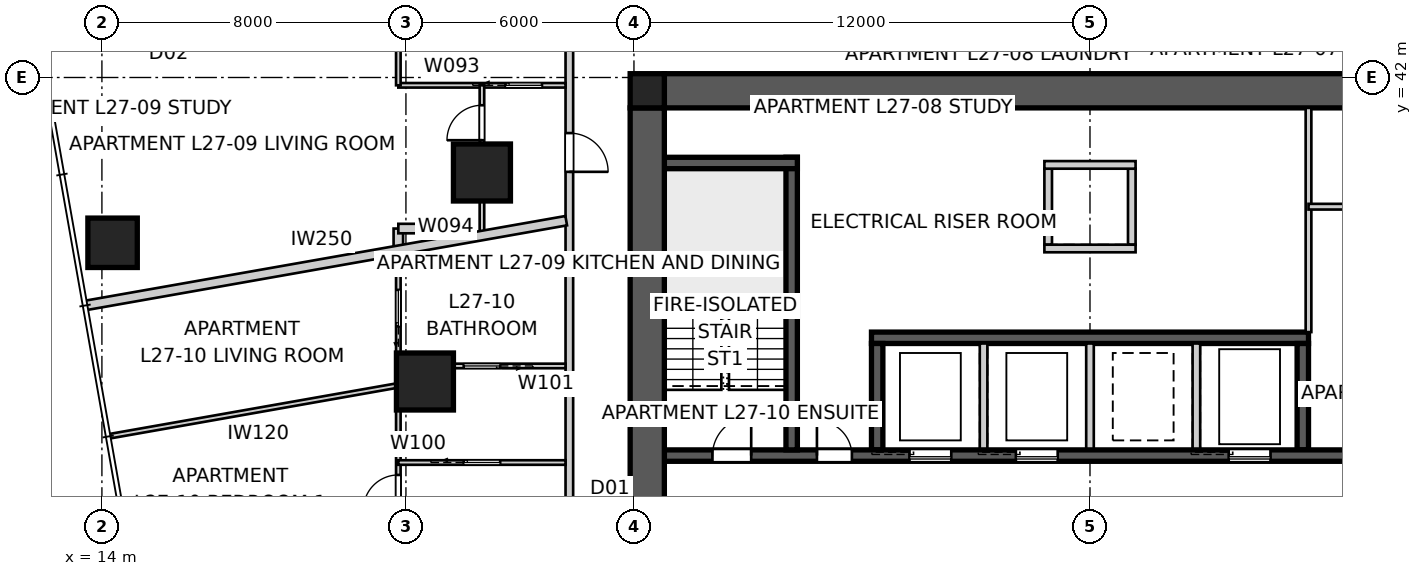
"""IFC4 building model, lengths in metres.
Left out: names, types, materials, properties, quantities, classifications, styles, units other than length and angle.
Written with IfcOpenShell. Run it as: python <this file> out.ifc"""

import sys

from ifc_helpers import new_model, si_unit, direction, frame, frame_2d, origin, origin_2d, place, context, subcontext, project, spatial, polyline, rectangle, outline, extrude, element, fill, save


model = new_model("IFC4")
c1 = context("Model", 3, precision=1e-05, world=origin(), true_north=direction((0.0, 1.0)))
c2 = subcontext(c1, "Body", "Model", "MODEL_VIEW")
j1 = project(units=[si_unit("LENGTHUNIT", "METRE"), si_unit("PLANEANGLEUNIT", "RADIAN")], contexts=[c1])
p1 = place(None, origin())
s1 = spatial("IfcSite", under=j1, at=p1, CompositionType="ELEMENT")
p2 = place(p1, origin())
s2 = spatial("IfcBuilding", under=s1, at=p2, CompositionType="ELEMENT")
p3 = place(p2, frame((0.0, 0.0, 99.8)))
s3 = spatial("IfcBuildingStorey", under=s2, at=p3, CompositionType="ELEMENT", Elevation=99.8)
p4 = place(p3, frame((28.8, 41.65, 0.0), z_axis=(0.0, 0.0, 1.0), x_axis=(1.0, 0.0, 0.0)))
e1 = element("IfcWall", 1, at=p4, inside=s3, PredefinedType="SHEAR", context=c2, shape_type="SweptSolid", body=[
    extrude(outline(polyline([(0.0, -0.45), (22.4, -0.45), (22.4, -0.025), (22.85, -0.025), (22.85, 0.025), (22.4, 0.025), (22.4, 0.45), (0.0, 0.45), (0.0, 0.025), (-0.45, 0.025), (-0.45, -0.025), (0.0, -0.025), (0.0, -0.45)])), origin(), (0.0, 0.0, 1.0), 3.4),
])
p5 = place(p3, frame((28.35, 41.2, 0.0), z_axis=(0.0, 0.0, 1.0), x_axis=(0.0, -1.0, 0.0)))
e2 = element("IfcWall", 2, at=p5, inside=s3, PredefinedType="SHEAR", context=c2, shape_type="SweptSolid", body=[
    extrude(outline(polyline([(0.0, -0.45), (22.4, -0.45), (22.4, -0.025), (22.85, -0.025), (22.85, 0.025), (22.4, 0.025), (22.4, 0.45), (0.0, 0.45), (0.0, 0.025), (-0.45, 0.025), (-0.45, -0.025), (0.0, -0.025), (0.0, -0.45)])), origin(), (0.0, 0.0, 1.0), 3.4),
])
p6 = place(p5, frame((11.14, 0.0, 0.0)))
e3 = element("IfcOpeningElement", 3, at=p6, cuts=e2, PredefinedType="OPENING", context=c2, shape_type="SweptSolid", body=[
    extrude(rectangle(XDim=1.02, YDim=2.4, at=frame_2d((0.51, 1.2))), frame((0.0, 0.46, 0.0), z_axis=(0.0, -1.0, 0.0), x_axis=(1.0, 0.0, 0.0)), (0.0, 0.0, 1.0), 0.92),
])
p7 = place(p3, frame((28.8, 32.05, 0.0), z_axis=(0.0, 0.0, 1.0), x_axis=(1.0, 0.0, 0.0)))
e4 = element("IfcWall", 4, at=p7, inside=s3, PredefinedType="SHEAR", context=c2, shape_type="SweptSolid", body=[
    extrude(rectangle(XDim=22.4, YDim=0.3, at=frame_2d((11.2, 0.0))), origin(), (0.0, 0.0, 1.0), 3.4),
])
p8 = place(p7, frame((19.04, 0.0, 0.0)))
e5 = element("IfcOpeningElement", 5, at=p8, cuts=e4, PredefinedType="OPENING", context=c2, shape_type="SweptSolid", body=[
    extrude(rectangle(XDim=0.92, YDim=2.1, at=frame_2d((0.46, 1.05))), frame((0.0, 0.16, 0.0), z_axis=(0.0, -1.0, 0.0), x_axis=(1.0, 0.0, 0.0)), (0.0, 0.0, 1.0), 0.32),
])
p9 = place(p7, frame((1.265, 0.0, 0.0)))
e6 = element("IfcOpeningElement", 6, at=p9, cuts=e4, PredefinedType="OPENING", context=c2, shape_type="SweptSolid", body=[
    extrude(rectangle(XDim=1.02, YDim=2.1, at=frame_2d((0.51, 1.05))), frame((0.0, 0.16, 0.0), z_axis=(0.0, -1.0, 0.0), x_axis=(1.0, 0.0, 0.0)), (0.0, 0.0, 1.0), 0.32),
])
p10 = place(p7, frame((4.015, 0.0, 0.0)))
e7 = element("IfcOpeningElement", 7, at=p10, cuts=e4, PredefinedType="OPENING", context=c2, shape_type="SweptSolid", body=[
    extrude(rectangle(XDim=0.92, YDim=2.1, at=frame_2d((0.46, 1.05))), frame((0.0, 0.16, 0.0), z_axis=(0.0, -1.0, 0.0), x_axis=(1.0, 0.0, 0.0)), (0.0, 0.0, 1.0), 0.32),
])
p11 = place(p7, frame((6.45, 0.0, 0.0)))
e8 = element("IfcOpeningElement", 8, at=p11, cuts=e4, PredefinedType="OPENING", context=c2, shape_type="SweptSolid", body=[
    extrude(rectangle(XDim=1.1, YDim=2.1, at=frame_2d((0.55, 1.05))), frame((0.0, 0.16, 0.0), z_axis=(0.0, -1.0, 0.0), x_axis=(1.0, 0.0, 0.0)), (0.0, 0.0, 1.0), 0.32),
])
p12 = place(p7, frame((9.25, 0.0, 0.0)))
e9 = element("IfcOpeningElement", 9, at=p12, cuts=e4, PredefinedType="OPENING", context=c2, shape_type="SweptSolid", body=[
    extrude(rectangle(XDim=1.1, YDim=2.1, at=frame_2d((0.55, 1.05))), frame((0.0, 0.16, 0.0), z_axis=(0.0, -1.0, 0.0), x_axis=(1.0, 0.0, 0.0)), (0.0, 0.0, 1.0), 0.32),
])
p13 = place(p7, frame((14.85, 0.0, 0.0)))
e10 = element("IfcOpeningElement", 10, at=p13, cuts=e4, PredefinedType="OPENING", context=c2, shape_type="SweptSolid", body=[
    extrude(rectangle(XDim=1.1, YDim=2.1, at=frame_2d((0.55, 1.05))), frame((0.0, 0.16, 0.0), z_axis=(0.0, -1.0, 0.0), x_axis=(1.0, 0.0, 0.0)), (0.0, 0.0, 1.0), 0.32),
])
p14 = place(p3, frame((34.25, 35.15, 0.0), z_axis=(0.0, 0.0, 1.0), x_axis=(1.0, 0.0, 0.0)))
e11 = element("IfcWall", 11, at=p14, inside=s3, PredefinedType="SHEAR", context=c2, shape_type="SweptSolid", body=[
    extrude(rectangle(XDim=11.5, YDim=0.3, at=frame_2d((5.75, 0.0))), origin(), (0.0, 0.0, 1.0), 3.4),
])
p15 = place(p3, frame((34.4, 32.2, 0.0), z_axis=(0.0, 0.0, 1.0), x_axis=(0.0, 1.0, 0.0)))
e12 = element("IfcWall", 12, at=p15, inside=s3, PredefinedType="SHEAR", context=c2, shape_type="SweptSolid", body=[
    extrude(rectangle(XDim=2.8, YDim=0.3, at=frame_2d((1.4, 0.0))), origin(), (0.0, 0.0, 1.0), 3.4),
])
for number, where, z_axis, x_axis in (
    (13, (37.2, 32.2, 0.0), (0.0, 0.0, 1.0), (0.0, 1.0, 0.0)),
    (14, (40.0, 32.2, 0.0), (0.0, 0.0, 1.0), (0.0, 1.0, 0.0)),
    (15, (42.8, 32.2, 0.0), (0.0, 0.0, 1.0), (0.0, 1.0, 0.0)),
):
    element("IfcWall", number, at=place(p3, frame(where, z_axis=z_axis, x_axis=x_axis)), inside=s3, PredefinedType="SOLIDWALL", context=c2, shape_type="SweptSolid", body=[
        extrude(rectangle(XDim=2.8, YDim=0.2, at=frame_2d((1.4, 0.0))), origin(), (0.0, 0.0, 1.0), 3.4),
    ])
p16 = place(p3, frame((45.6, 32.2, 0.0), z_axis=(0.0, 0.0, 1.0), x_axis=(0.0, 1.0, 0.0)))
e16 = element("IfcWall", 16, at=p16, inside=s3, PredefinedType="SHEAR", context=c2, shape_type="SweptSolid", body=[
    extrude(rectangle(XDim=2.8, YDim=0.3, at=frame_2d((1.4, 0.0))), origin(), (0.0, 0.0, 1.0), 3.4),
])
p17 = place(p3, frame((32.15, 32.2, 0.0), z_axis=(0.0, 0.0, 1.0), x_axis=(0.0, 1.0, 0.0)))
e17 = element("IfcWall", 17, at=p17, inside=s3, PredefinedType="SHEAR", context=c2, shape_type="SweptSolid", body=[
    extrude(rectangle(XDim=7.7, YDim=0.3, at=frame_2d((3.85, 0.0))), origin(), (0.0, 0.0, 1.0), 3.4),
])
p18 = place(p3, frame((28.8, 39.75, 0.0), z_axis=(0.0, 0.0, 1.0), x_axis=(1.0, 0.0, 0.0)))
e18 = element("IfcWall", 18, at=p18, inside=s3, PredefinedType="SHEAR", context=c2, shape_type="SweptSolid", body=[
    extrude(rectangle(XDim=3.5, YDim=0.3, at=frame_2d((1.75, 0.0))), origin(), (0.0, 0.0, 1.0), 3.4),
])
for number, where, z_axis, x_axis in (
    (19, (38.9, 37.6, 0.0), (0.0, 0.0, 1.0), (0.0, 1.0, 0.0)),
    (20, (41.1, 37.6, 0.0), (0.0, 0.0, 1.0), (0.0, 1.0, 0.0)),
):
    element("IfcWall", number, at=place(p3, frame(where, z_axis=z_axis, x_axis=x_axis)), inside=s3, PredefinedType="SOLIDWALL", context=c2, shape_type="SweptSolid", body=[
        extrude(rectangle(XDim=2.0, YDim=0.2, at=frame_2d((1.0, 0.0))), origin(), (0.0, 0.0, 1.0), 3.4),
    ])
for number, where, z_axis, x_axis in (
    (21, (38.8, 37.5, 0.0), (0.0, 0.0, 1.0), (1.0, 0.0, 0.0)),
    (22, (38.8, 39.7, 0.0), (0.0, 0.0, 1.0), (1.0, 0.0, 0.0)),
):
    element("IfcWall", number, at=place(p3, frame(where, z_axis=z_axis, x_axis=x_axis)), inside=s3, PredefinedType="SOLIDWALL", context=c2, shape_type="SweptSolid", body=[
        extrude(rectangle(XDim=2.4, YDim=0.2, at=frame_2d((1.2, 0.0))), origin(), (0.0, 0.0, 1.0), 3.4),
    ])
p19 = place(p3, frame((28.35, 41.65, 0.0), z_axis=(0.0, 0.0, 1.0), x_axis=(1.0, 0.0, 0.0)))
e23 = element("IfcColumn", 23, at=p19, inside=s3, PredefinedType="COLUMN", context=c2, shape_type="SweptSolid", body=[
    extrude(rectangle(XDim=0.9, YDim=0.9, at=origin_2d()), origin(), (0.0, 0.0, 1.0), 3.4),
])
p20 = place(p3, frame((14.281, 37.65, 0.0), z_axis=(0.0, 0.0, 1.0), x_axis=(1.0, 0.0, 0.0)))
e24 = element("IfcColumn", 24, at=p20, inside=s3, PredefinedType="COLUMN", context=c2, shape_type="SweptSolid", body=[
    extrude(rectangle(XDim=1.3, YDim=1.3, at=origin_2d()), origin(), (0.0, 0.0, 1.0), 3.4),
])
for number, where, z_axis, x_axis in (
    (25, (24.0, 39.5, 0.0), (0.0, 0.0, 1.0), (1.0, 0.0, 0.0)),
    (26, (22.5, 34.0, 0.0), (0.0, 0.0, 1.0), (1.0, 0.0, 0.0)),
):
    element("IfcColumn", number, at=place(p3, frame(where, z_axis=z_axis, x_axis=x_axis)), inside=s3, PredefinedType="COLUMN", context=c2, shape_type="SweptSolid", body=[
        extrude(rectangle(XDim=1.5, YDim=1.5, at=origin_2d()), origin(), (0.0, 0.0, 1.0), 3.4),
    ])
p21 = place(p3, frame((26.3, 44.5, 0.0), z_axis=(0.0, 0.0, 1.0), x_axis=(0.0, -1.0, 0.0)))
e27 = element("IfcWall", 27, at=p21, inside=s3, PredefinedType="PARTITIONING", context=c2, shape_type="SweptSolid", body=[
    extrude(rectangle(XDim=29.0, YDim=0.2, at=frame_2d((14.5, 0.0))), origin(), (0.0, 0.0, 1.0), 3.25),
])
p22 = place(p21, frame((14.257, 0.0, 0.0)))
e28 = element("IfcOpeningElement", 28, at=p22, cuts=e27, PredefinedType="OPENING", context=c2, shape_type="SweptSolid", body=[
    extrude(rectangle(XDim=1.02, YDim=2.34, at=frame_2d((0.51, 1.17))), frame((0.0, 0.11, 0.0), z_axis=(0.0, -1.0, 0.0), x_axis=(1.0, 0.0, 0.0)), (0.0, 0.0, 1.0), 0.22),
])
p23 = place(p21, frame((18.322, 0.0, 0.0)))
e29 = element("IfcOpeningElement", 29, at=p23, cuts=e27, PredefinedType="OPENING", context=c2, shape_type="SweptSolid", body=[
    extrude(rectangle(XDim=1.02, YDim=2.34, at=frame_2d((0.51, 1.17))), frame((0.0, 0.11, 0.0), z_axis=(0.0, -1.0, 0.0), x_axis=(1.0, 0.0, 0.0)), (0.0, 0.0, 1.0), 0.22),
])
p24 = place(p21, frame((3.963, 0.0, 0.0)))
e30 = element("IfcOpeningElement", 30, at=p24, cuts=e27, PredefinedType="OPENING", context=c2, shape_type="SweptSolid", body=[
    extrude(rectangle(XDim=1.02, YDim=2.34, at=frame_2d((0.51, 1.17))), frame((0.0, 0.11, 0.0), z_axis=(0.0, -1.0, 0.0), x_axis=(1.0, 0.0, 0.0)), (0.0, 0.0, 1.0), 0.22),
])
p25 = place(p3, frame((13.556, 35.999, 0.0), z_axis=(0.0, 0.0, 1.0), x_axis=(0.984809355703, 0.173639088111, 0.0)))
e31 = element("IfcWall", 31, at=p25, inside=s3, PredefinedType="PARTITIONING", context=c2, shape_type="SweptSolid", body=[
    extrude(rectangle(XDim=12.857, YDim=0.25, at=frame_2d((6.428, 0.0))), origin(), (0.0, 0.0, 1.0), 3.25),
])
p26 = place(p3, frame((45.75, 41.2, 0.0), z_axis=(0.0, 0.0, 1.0), x_axis=(0.0, -1.0, 0.0)))
e32 = element("IfcWall", 32, at=p26, inside=s3, PredefinedType="SOLIDWALL", context=c2, shape_type="SweptSolid", body=[
    extrude(rectangle(XDim=5.9, YDim=0.15, at=frame_2d((2.95, 0.0))), origin(), (0.0, 0.0, 1.0), 3.25),
])
p27 = place(p3, frame((45.75, 38.6, 0.0), z_axis=(0.0, 0.0, 1.0), x_axis=(1.0, 0.0, 0.0)))
e33 = element("IfcWall", 33, at=p27, inside=s3, PredefinedType="SOLIDWALL", context=c2, shape_type="SweptSolid", body=[
    extrude(rectangle(XDim=5.45, YDim=0.15, at=frame_2d((2.725, 0.0))), origin(), (0.0, 0.0, 1.0), 3.25),
])
p28 = place(p27, frame((2.265, 0.0, 0.0)))
e34 = element("IfcOpeningElement", 34, at=p28, cuts=e33, PredefinedType="OPENING", context=c2, shape_type="SweptSolid", body=[
    extrude(rectangle(XDim=0.92, YDim=2.1, at=frame_2d((0.46, 1.05))), frame((0.0, 0.085, 0.0), z_axis=(0.0, -1.0, 0.0), x_axis=(1.0, 0.0, 0.0)), (0.0, 0.0, 1.0), 0.17),
])
p29 = place(p3, frame((21.8, 11.8, 0.0), z_axis=(0.0, 0.0, 1.0), x_axis=(0.0, 1.0, 0.0)))
e35 = element("IfcWall", 35, at=p29, inside=s3, PredefinedType="PARTITIONING", context=c2, shape_type="SweptSolid", body=[
    extrude(rectangle(XDim=25.653, YDim=0.12, at=frame_2d((12.826, 0.0))), origin(), (0.0, 0.0, 1.0), 3.25),
])
p30 = place(p29, frame((16.333, 0.0, 0.0)))
e36 = element("IfcOpeningElement", 36, at=p30, cuts=e35, PredefinedType="OPENING", context=c2, shape_type="SweptSolid", body=[
    extrude(rectangle(XDim=0.92, YDim=2.34, at=frame_2d((0.46, 1.17))), frame((0.0, 0.07, 0.0), z_axis=(0.0, -1.0, 0.0), x_axis=(1.0, 0.0, 0.0)), (0.0, 0.0, 1.0), 0.14),
])
p31 = place(p29, frame((18.821, 0.0, 0.0)))
e37 = element("IfcOpeningElement", 37, at=p31, cuts=e35, PredefinedType="OPENING", context=c2, shape_type="SweptSolid", body=[
    extrude(rectangle(XDim=0.92, YDim=2.34, at=frame_2d((0.46, 1.17))), frame((0.0, 0.07, 0.0), z_axis=(0.0, -1.0, 0.0), x_axis=(1.0, 0.0, 0.0)), (0.0, 0.0, 1.0), 0.14),
])
p32 = place(p29, frame((12.401, 0.0, 0.0)))
e38 = element("IfcOpeningElement", 38, at=p32, cuts=e35, PredefinedType="OPENING", context=c2, shape_type="SweptSolid", body=[
    extrude(rectangle(XDim=0.92, YDim=2.34, at=frame_2d((0.46, 1.17))), frame((0.0, 0.07, 0.0), z_axis=(0.0, -1.0, 0.0), x_axis=(1.0, 0.0, 0.0)), (0.0, 0.0, 1.0), 0.14),
])
p33 = place(p29, frame((2.066, 0.0, 0.0)))
e39 = element("IfcOpeningElement", 39, at=p33, cuts=e35, PredefinedType="OPENING", context=c2, shape_type="SweptSolid", body=[
    extrude(rectangle(XDim=0.92, YDim=2.34, at=frame_2d((0.46, 1.17))), frame((0.0, 0.07, 0.0), z_axis=(0.0, -1.0, 0.0), x_axis=(1.0, 0.0, 0.0)), (0.0, 0.0, 1.0), 0.14),
])
p34 = place(p29, frame((23.651, 0.0, 0.0)))
e40 = element("IfcOpeningElement", 40, at=p34, cuts=e35, PredefinedType="OPENING", context=c2, shape_type="SweptSolid", body=[
    extrude(rectangle(XDim=0.96, YDim=2.1, at=frame_2d((0.48, 1.05))), frame((0.0, 0.07, 0.0), z_axis=(0.0, -1.0, 0.0), x_axis=(1.0, 0.0, 0.0)), (0.0, 0.0, 1.0), 0.14),
])
p35 = place(p3, frame((21.8, 37.478, 0.0), z_axis=(0.0, 0.0, 1.0), x_axis=(0.0, 1.0, 0.0)))
e41 = element("IfcWall", 41, at=p35, inside=s3, PredefinedType="PARTITIONING", context=c2, shape_type="SweptSolid", body=[
    extrude(rectangle(XDim=0.547, YDim=0.25, at=frame_2d((0.273, 0.0))), origin(), (0.0, 0.0, 1.0), 3.25),
])
p36 = place(p3, frame((21.8, 38.025, 0.0), z_axis=(0.0, 0.0, 1.0), x_axis=(1.0, 0.0, 0.0)))
e42 = element("IfcWall", 42, at=p36, inside=s3, PredefinedType="PARTITIONING", context=c2, shape_type="SweptSolid", body=[
    extrude(rectangle(XDim=1.861, YDim=0.25, at=frame_2d((0.93, 0.0))), origin(), (0.0, 0.0, 1.0), 3.25),
])
p37 = place(p3, frame((21.8, 41.795, 0.0), z_axis=(0.0, 0.0, 1.0), x_axis=(1.0, 0.0, 0.0)))
e43 = element("IfcWall", 43, at=p37, inside=s3, PredefinedType="PARTITIONING", context=c2, shape_type="SweptSolid", body=[
    extrude(rectangle(XDim=4.4, YDim=0.12, at=frame_2d((2.2, 0.0))), origin(), (0.0, 0.0, 1.0), 3.25),
])
p38 = place(p37, frame((2.82, 0.0, 0.0)))
e44 = element("IfcOpeningElement", 44, at=p38, cuts=e43, PredefinedType="OPENING", context=c2, shape_type="SweptSolid", body=[
    extrude(rectangle(XDim=0.96, YDim=2.1, at=frame_2d((0.48, 1.05))), frame((0.0, 0.07, 0.0), z_axis=(0.0, -1.0, 0.0), x_axis=(1.0, 0.0, 0.0)), (0.0, 0.0, 1.0), 0.14),
])
p39 = place(p3, frame((24.0, 37.948, 0.0), z_axis=(0.0, 0.0, 1.0), x_axis=(0.0, 1.0, 0.0)))
e45 = element("IfcWall", 45, at=p39, inside=s3, PredefinedType="PARTITIONING", context=c2, shape_type="SweptSolid", body=[
    extrude(rectangle(XDim=3.847, YDim=0.12, at=frame_2d((1.923, 0.0))), origin(), (0.0, 0.0, 1.0), 2.55),
])
p40 = place(p39, frame((2.402, 0.0, 0.0)))
e46 = element("IfcOpeningElement", 46, at=p40, cuts=e45, PredefinedType="OPENING", context=c2, shape_type="SweptSolid", body=[
    extrude(rectangle(XDim=0.92, YDim=2.34, at=frame_2d((0.46, 1.17))), frame((0.0, 0.07, 0.0), z_axis=(0.0, -1.0, 0.0), x_axis=(1.0, 0.0, 0.0)), (0.0, 0.0, 1.0), 0.14),
])
p41 = place(p3, frame((21.8, 41.795, 0.0), z_axis=(0.0, 0.0, 1.0), x_axis=(0.0, 1.0, 0.0)))
e47 = element("IfcWall", 47, at=p41, inside=s3, PredefinedType="PARTITIONING", context=c2, shape_type="SweptSolid", body=[
    extrude(rectangle(XDim=6.405, YDim=0.12, at=frame_2d((3.203, 0.0))), origin(), (0.0, 0.0, 1.0), 3.25),
])
p42 = place(p3, frame((21.8, 31.868, 0.0), z_axis=(0.0, 0.0, 1.0), x_axis=(1.0, 0.0, 0.0)))
e48 = element("IfcWall", 48, at=p42, inside=s3, PredefinedType="PARTITIONING", context=c2, shape_type="SweptSolid", body=[
    extrude(rectangle(XDim=4.4, YDim=0.12, at=frame_2d((2.2, 0.0))), origin(), (0.0, 0.0, 1.0), 3.25),
])
p43 = place(p42, frame((1.72, 0.0, 0.0)))
e49 = element("IfcOpeningElement", 49, at=p43, cuts=e48, PredefinedType="OPENING", context=c2, shape_type="SweptSolid", body=[
    extrude(rectangle(XDim=0.96, YDim=2.1, at=frame_2d((0.48, 1.05))), frame((0.0, 0.07, 0.0), z_axis=(0.0, -1.0, 0.0), x_axis=(1.0, 0.0, 0.0)), (0.0, 0.0, 1.0), 0.14),
])
p44 = place(p3, frame((26.2, 34.409, 0.0), z_axis=(0.0, 0.0, 1.0), x_axis=(-1.0, 0.0, 0.0)))
e50 = element("IfcWall", 50, at=p44, inside=s3, PredefinedType="PARTITIONING", context=c2, shape_type="SweptSolid", body=[
    extrude(rectangle(XDim=4.4, YDim=0.12, at=frame_2d((2.2, 0.0))), origin(), (0.0, 0.0, 1.0), 3.25),
])
p45 = place(p44, frame((1.72, 0.0, 0.0)))
e51 = element("IfcOpeningElement", 51, at=p45, cuts=e50, PredefinedType="OPENING", context=c2, shape_type="SweptSolid", body=[
    extrude(rectangle(XDim=0.96, YDim=2.1, at=frame_2d((0.48, 1.05))), frame((0.0, 0.07, 0.0), z_axis=(0.0, -1.0, 0.0), x_axis=(1.0, 0.0, 0.0)), (0.0, 0.0, 1.0), 0.14),
])
p46 = place(p3, frame((21.8, 33.899, 0.0), z_axis=(0.0, 0.0, 1.0), x_axis=(-0.984804581119, -0.173666165406, 0.0)))
e52 = element("IfcWall", 52, at=p46, inside=s3, PredefinedType="PARTITIONING", context=c2, shape_type="SweptSolid", body=[
    extrude(rectangle(XDim=7.714, YDim=0.12, at=frame_2d((3.857, 0.0))), origin(), (0.0, 0.0, 1.0), 3.25),
])
p47 = place(p9, origin())
e53 = element("IfcDoor", 53, at=p47, inside=s3, OperationType="SINGLE_SWING_RIGHT", PredefinedType="DOOR", context=c2, shape_type="SweptSolid", body=[
    extrude(rectangle(XDim=1.02, YDim=2.1, at=frame_2d((0.51, 1.05))), frame((0.0, 0.025, 0.0), z_axis=(0.0, -1.0, 0.0), x_axis=(1.0, 0.0, 0.0)), (0.0, 0.0, 1.0), 0.05),
])
fill(e6, e53)
p48 = place(p10, origin())
e54 = element("IfcDoor", 54, at=p48, inside=s3, OperationType="SINGLE_SWING_LEFT", PredefinedType="DOOR", context=c2, shape_type="SweptSolid", body=[
    extrude(rectangle(XDim=0.92, YDim=2.1, at=frame_2d((0.46, 1.05))), frame((0.0, 0.025, 0.0), z_axis=(0.0, -1.0, 0.0), x_axis=(1.0, 0.0, 0.0)), (0.0, 0.0, 1.0), 0.05),
])
fill(e7, e54)
p49 = place(p24, origin())
e55 = element("IfcDoor", 55, at=p49, inside=s3, OperationType="SINGLE_SWING_RIGHT", PredefinedType="DOOR", context=c2, shape_type="SweptSolid", body=[
    extrude(rectangle(XDim=1.02, YDim=2.34, at=frame_2d((0.51, 1.17))), frame((0.0, 0.025, 0.0), z_axis=(0.0, -1.0, 0.0), x_axis=(1.0, 0.0, 0.0)), (0.0, 0.0, 1.0), 0.05),
])
fill(e30, e55)
p50 = place(p43, origin())
e56 = element("IfcDoor", 56, at=p50, inside=s3, OperationType="SLIDING_TO_LEFT", PredefinedType="DOOR", context=c2, shape_type="SweptSolid", body=[
    extrude(rectangle(XDim=0.96, YDim=2.1, at=frame_2d((0.48, 1.05))), frame((0.0, 0.025, 0.0), z_axis=(0.0, -1.0, 0.0), x_axis=(1.0, 0.0, 0.0)), (0.0, 0.0, 1.0), 0.05),
])
fill(e49, e56)
p51 = place(p31, origin())
e57 = element("IfcDoor", 57, at=p51, inside=s3, OperationType="SINGLE_SWING_LEFT", PredefinedType="DOOR", context=c2, shape_type="SweptSolid", body=[
    extrude(rectangle(XDim=0.92, YDim=2.34, at=frame_2d((0.46, 1.17))), frame((0.0, 0.025, 0.0), z_axis=(0.0, -1.0, 0.0), x_axis=(1.0, 0.0, 0.0)), (0.0, 0.0, 1.0), 0.05),
])
fill(e37, e57)
p52 = place(p40, origin())
e58 = element("IfcDoor", 58, at=p52, inside=s3, OperationType="SINGLE_SWING_LEFT", PredefinedType="DOOR", context=c2, shape_type="SweptSolid", body=[
    extrude(rectangle(XDim=0.92, YDim=2.34, at=frame_2d((0.46, 1.17))), frame((0.0, 0.025, 0.0), z_axis=(0.0, -1.0, 0.0), x_axis=(1.0, 0.0, 0.0)), (0.0, 0.0, 1.0), 0.05),
])
fill(e46, e58)
p53 = place(p38, origin())
e59 = element("IfcDoor", 59, at=p53, inside=s3, OperationType="SLIDING_TO_LEFT", PredefinedType="DOOR", context=c2, shape_type="SweptSolid", body=[
    extrude(rectangle(XDim=0.96, YDim=2.1, at=frame_2d((0.48, 1.05))), frame((0.0, 0.025, 0.0), z_axis=(0.0, -1.0, 0.0), x_axis=(1.0, 0.0, 0.0)), (0.0, 0.0, 1.0), 0.05),
])
fill(e44, e59)
p54 = place(p45, origin())
e60 = element("IfcDoor", 60, at=p54, inside=s3, OperationType="SLIDING_TO_LEFT", PredefinedType="DOOR", context=c2, shape_type="SweptSolid", body=[
    extrude(rectangle(XDim=0.96, YDim=2.1, at=frame_2d((0.48, 1.05))), frame((0.0, 0.025, 0.0), z_axis=(0.0, -1.0, 0.0), x_axis=(1.0, 0.0, 0.0)), (0.0, 0.0, 1.0), 0.05),
])
fill(e51, e60)
p55 = place(p34, origin())
e61 = element("IfcDoor", 61, at=p55, inside=s3, OperationType="SLIDING_TO_LEFT", PredefinedType="DOOR", context=c2, shape_type="SweptSolid", body=[
    extrude(rectangle(XDim=0.96, YDim=2.1, at=frame_2d((0.48, 1.05))), frame((0.0, 0.025, 0.0), z_axis=(0.0, -1.0, 0.0), x_axis=(1.0, 0.0, 0.0)), (0.0, 0.0, 1.0), 0.05),
])
fill(e40, e61)
p56 = place(p11, origin())
e62 = element("IfcDoor", 62, at=p56, inside=s3, OperationType="SLIDING_TO_LEFT", PredefinedType="DOOR", context=c2, shape_type="SweptSolid", body=[
    extrude(rectangle(XDim=1.1, YDim=2.1, at=frame_2d((0.55, 1.05))), frame((0.0, 0.025, 0.0), z_axis=(0.0, -1.0, 0.0), x_axis=(1.0, 0.0, 0.0)), (0.0, 0.0, 1.0), 0.05),
])
fill(e8, e62)
p57 = place(p12, origin())
e63 = element("IfcDoor", 63, at=p57, inside=s3, OperationType="SLIDING_TO_LEFT", PredefinedType="DOOR", context=c2, shape_type="SweptSolid", body=[
    extrude(rectangle(XDim=1.1, YDim=2.1, at=frame_2d((0.55, 1.05))), frame((0.0, 0.025, 0.0), z_axis=(0.0, -1.0, 0.0), x_axis=(1.0, 0.0, 0.0)), (0.0, 0.0, 1.0), 0.05),
])
fill(e9, e63)
p58 = place(p13, origin())
e64 = element("IfcDoor", 64, at=p58, inside=s3, OperationType="SLIDING_TO_LEFT", PredefinedType="DOOR", context=c2, shape_type="SweptSolid", body=[
    extrude(rectangle(XDim=1.1, YDim=2.1, at=frame_2d((0.55, 1.05))), frame((0.0, 0.025, 0.0), z_axis=(0.0, -1.0, 0.0), x_axis=(1.0, 0.0, 0.0)), (0.0, 0.0, 1.0), 0.05),
])
fill(e10, e64)
save(model, sys.argv[1])
